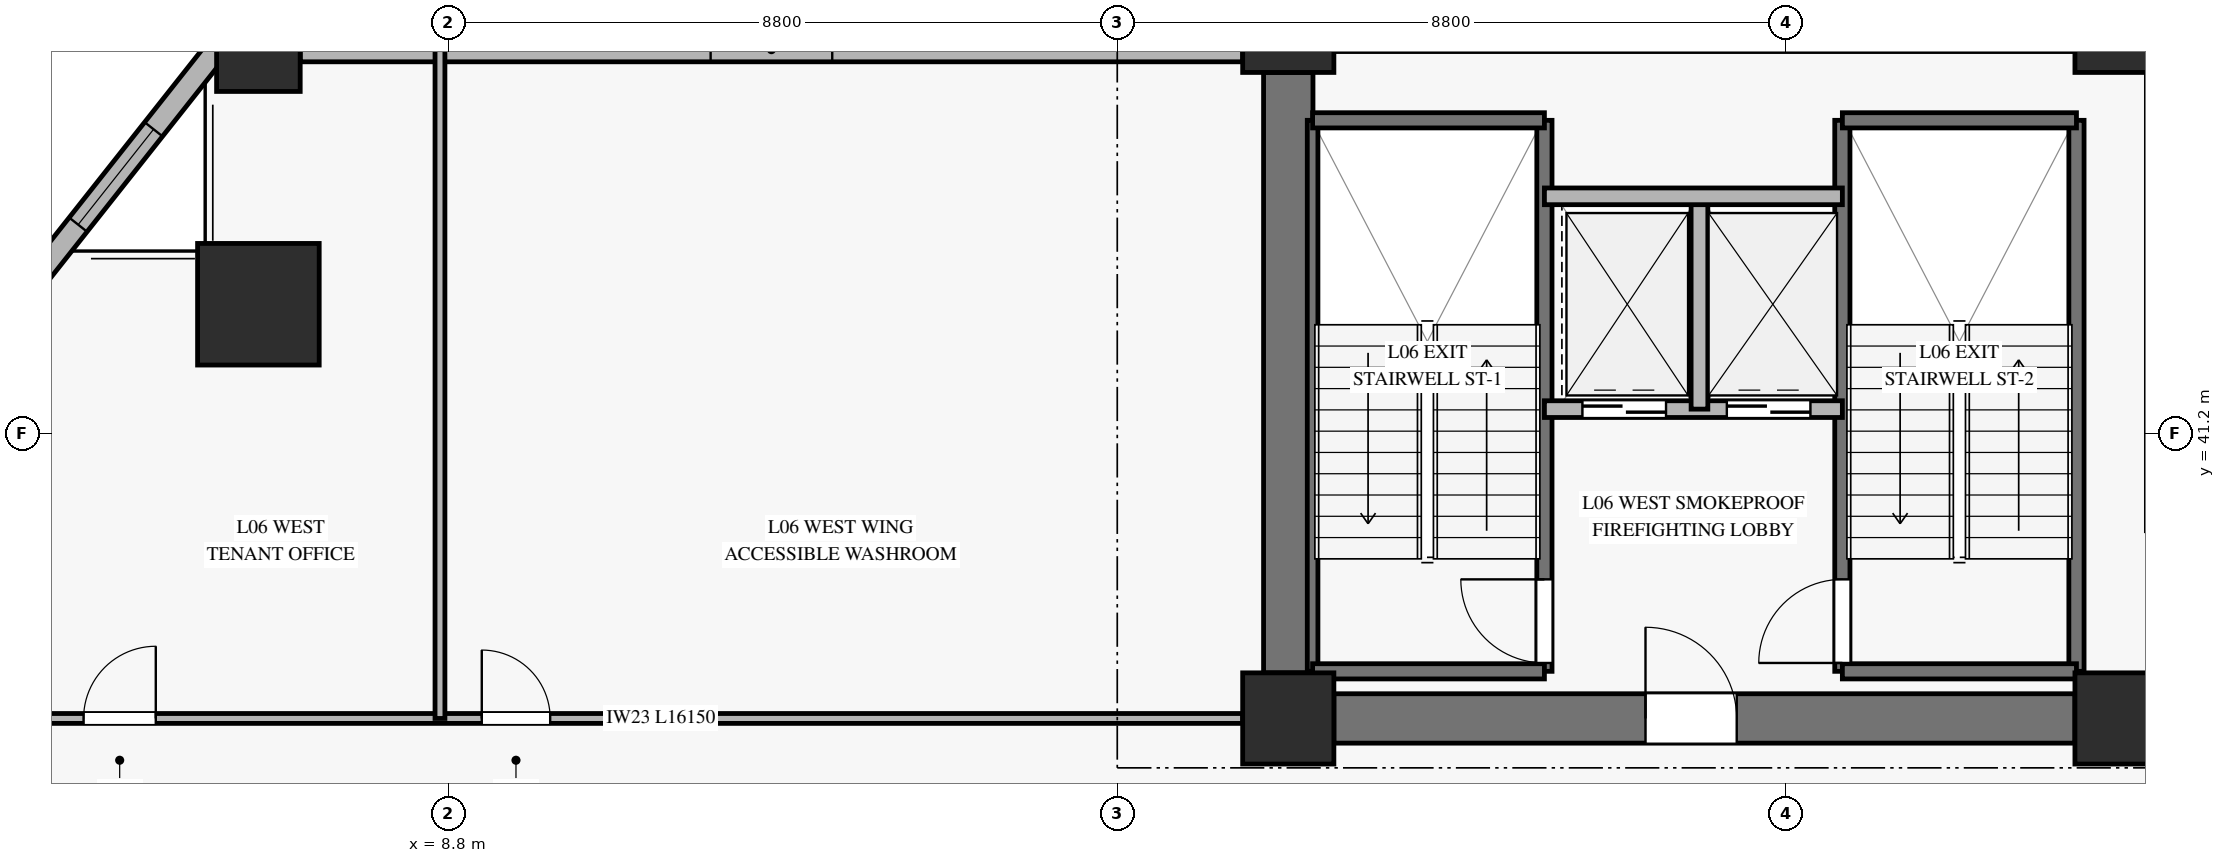
"""IFC4 building model, lengths in metres.
Left out: names, types, materials, properties, quantities, classifications, styles, units other than length and angle.
Written with IfcOpenShell. Run it as: python <this file> out.ifc"""

import sys

from ifc_helpers import new_model, si_unit, direction, frame, frame_2d, origin, origin_2d, place, context, subcontext, project, spatial, rectangle, hollow_rectangle, extrude, source, transform, mapped, element, fill, save


model = new_model("IFC4")
c1 = context("Model", 3, precision=1e-05, world=origin(), true_north=direction((0.0, 1.0)))
c2 = subcontext(c1, "Body", "Model", "MODEL_VIEW")
j1 = project(units=[si_unit("LENGTHUNIT", "METRE"), si_unit("PLANEANGLEUNIT", "RADIAN")], contexts=[c1])
p1 = place(None, origin())
s1 = spatial("IfcSite", under=j1, at=p1, CompositionType="ELEMENT")
p2 = place(p1, origin())
s2 = spatial("IfcBuilding", under=s1, at=p2, CompositionType="ELEMENT")
p3 = place(p2, frame((0.0, 0.0, 25.4)))
s3 = spatial("IfcBuildingStorey", under=s2, at=p3, CompositionType="ELEMENT", Elevation=25.4)
m1 = source(origin(), c2, "Body", "SweptSolid", [
    extrude(rectangle(XDim=1.2, YDim=1.2, at=origin_2d()), origin(), (0.0, 0.0, 1.0), 3.68),
])
for number, where, z_axis, x_axis in (
    (1, (19.85, 37.45, 0.0), (0.0, 0.0, 1.0), (1.0, 0.0, 0.0)),
    (2, (19.85, 46.55, 0.0), (0.0, 0.0, 1.0), (1.0, 0.0, 0.0)),
    (3, (30.8, 37.45, 0.0), (0.0, 0.0, 1.0), (1.0, 0.0, 0.0)),
    (4, (30.8, 46.55, 0.0), (0.0, 0.0, 1.0), (1.0, 0.0, 0.0)),
):
    element("IfcColumn", number, at=place(p3, frame(where, z_axis=z_axis, x_axis=x_axis)), inside=s3, PredefinedType="PILASTER", context=c2, shape_type="MappedRepresentation", body=[
        mapped(m1, transform((0.0, 0.0, 0.0), x_axis=(1.0, 0.0, 0.0), y_axis=(0.0, 1.0, 0.0), z_axis=(0.0, 0.0, 1.0), scale=1.0)),
    ])
p4 = place(p3, frame((20.45, 37.45, 0.0), z_axis=(0.0, 0.0, 1.0), x_axis=(1.0, 0.0, 0.0)))
e5 = element("IfcWall", 5, at=p4, inside=s3, PredefinedType="SHEAR", context=c2, shape_type="SweptSolid", body=[
    extrude(rectangle(XDim=9.75, YDim=0.65, at=frame_2d((4.875, 0.0))), origin(), (0.0, 0.0, 1.0), 3.68),
])
p5 = place(p4, frame((4.1, 0.0, 0.0)))
e6 = element("IfcOpeningElement", 6, at=p5, cuts=e5, PredefinedType="OPENING", context=c2, shape_type="SweptSolid", body=[
    extrude(rectangle(XDim=1.2, YDim=2.15, at=frame_2d((0.6, 1.075))), frame((0.0, 0.335, 0.0), z_axis=(0.0, -1.0, 0.0), x_axis=(1.0, 0.0, 0.0)), (0.0, 0.0, 1.0), 0.67),
])
p6 = place(p3, frame((19.85, 38.05, 0.0), z_axis=(0.0, 0.0, 1.0), x_axis=(0.0, 1.0, 0.0)))
e7 = element("IfcWall", 7, at=p6, inside=s3, PredefinedType="SHEAR", context=c2, shape_type="SweptSolid", body=[
    extrude(rectangle(XDim=7.9, YDim=0.65, at=frame_2d((3.95, 0.0))), origin(), (0.0, 0.0, 1.0), 3.68),
])
m2 = source(origin(), c2, "Body", "SweptSolid", [
    extrude(hollow_rectangle(XDim=1.6, YDim=1.6, WallThickness=0.075, at=origin_2d()), origin(), (0.0, 0.0, 1.0), 3.68),
])
p7 = place(p3, frame((6.3, 42.9, 0.0), z_axis=(0.0, 0.0, 1.0), x_axis=(1.0, 0.0, 0.0)))
e8 = element("IfcColumn", 8, at=p7, inside=s3, PredefinedType="COLUMN", context=c2, shape_type="MappedRepresentation", body=[
    mapped(m2, transform((0.0, 0.0, 0.0), x_axis=(1.0, 0.0, 0.0), y_axis=(0.0, 1.0, 0.0), z_axis=(0.0, 0.0, 1.0), scale=1.0)),
])
m3 = source(origin(), c2, "Body", "SweptSolid", [
    extrude(hollow_rectangle(XDim=1.1, YDim=1.1, WallThickness=0.05, at=origin_2d()), origin(), (0.0, 0.0, 1.0), 3.68),
])
p8 = place(p3, frame((6.3, 46.25, 0.0), z_axis=(0.0, 0.0, 1.0), x_axis=(1.0, 0.0, 0.0)))
e9 = element("IfcColumn", 9, at=p8, inside=s3, PredefinedType="COLUMN", context=c2, shape_type="MappedRepresentation", body=[
    mapped(m3, transform((0.0, 0.0, 0.0), x_axis=(1.0, 0.0, 0.0), y_axis=(0.0, 1.0, 0.0), z_axis=(0.0, 0.0, 1.0), scale=1.0)),
])
p9 = place(p3, frame((6.85, 46.25, 0.0), z_axis=(0.0, 0.0, 1.0), x_axis=(1.0, 0.0, 0.0)))
e10 = element("IfcWall", 10, at=p9, inside=s3, PredefinedType="SOLIDWALL", context=c2, shape_type="SweptSolid", body=[
    extrude(rectangle(XDim=12.4, YDim=0.32, at=frame_2d((6.2, 0.0))), origin(), (0.0, 0.0, 1.0), 3.16),
])
p10 = place(p9, frame((5.4, 0.0, 0.45)))
e11 = element("IfcOpeningElement", 11, at=p10, cuts=e10, PredefinedType="OPENING", context=c2, shape_type="SweptSolid", body=[
    extrude(rectangle(XDim=1.6, YDim=2.0, at=frame_2d((0.8, 1.0))), frame((0.0, 0.17, 0.0), z_axis=(0.0, -1.0, 0.0), x_axis=(1.0, 0.0, 0.0)), (0.0, 0.0, 1.0), 0.34),
])
p11 = place(p3, frame((5.75, 46.25, 0.0), z_axis=(0.0, 0.0, 1.0), x_axis=(-0.620377885234, -0.784303053361, 0.0)))
e12 = element("IfcWall", 12, at=p11, inside=s3, PredefinedType="SOLIDWALL", context=c2, shape_type="SweptSolid", body=[
    extrude(rectangle(XDim=4.271, YDim=0.3, at=frame_2d((2.136, 0.0))), origin(), (0.0, 0.0, 1.0), 3.16),
])
p12 = place(p11, frame((1.336, 0.0, 0.45)))
e13 = element("IfcOpeningElement", 13, at=p12, cuts=e12, PredefinedType="OPENING", context=c2, shape_type="SweptSolid", body=[
    extrude(rectangle(XDim=1.6, YDim=2.0, at=frame_2d((0.8, 1.0))), frame((0.0, 0.16, 0.0), z_axis=(0.0, -1.0, 0.0), x_axis=(1.0, 0.0, 0.0)), (0.0, 0.0, 1.0), 0.32),
])
p13 = place(p3, frame((20.17, 38.07, 0.0), z_axis=(0.0, 0.0, 1.0), x_axis=(0.0, 1.0, 0.0)))
e14 = element("IfcWall", 14, at=p13, inside=s3, PredefinedType="SOLIDWALL", context=c2, shape_type="SweptSolid", body=[
    extrude(rectangle(XDim=7.25, YDim=0.14, at=frame_2d((3.625, 0.0))), origin(), (0.0, 0.0, 1.0), 3.9),
])
p14 = place(p3, frame((23.22, 38.07, 0.0), z_axis=(0.0, 0.0, 1.0), x_axis=(0.0, 1.0, 0.0)))
e15 = element("IfcWall", 15, at=p14, inside=s3, PredefinedType="SOLIDWALL", context=c2, shape_type="SweptSolid", body=[
    extrude(rectangle(XDim=7.25, YDim=0.2, at=frame_2d((3.625, 0.0))), origin(), (0.0, 0.0, 1.0), 3.9),
])
p15 = place(p14, frame((0.11, 0.0, 0.0)))
e16 = element("IfcOpeningElement", 16, at=p15, cuts=e15, PredefinedType="OPENING", context=c2, shape_type="SweptSolid", body=[
    extrude(rectangle(XDim=1.1, YDim=2.15, at=frame_2d((0.55, 1.075))), frame((0.0, 0.11, 0.0), z_axis=(0.0, -1.0, 0.0), x_axis=(1.0, 0.0, 0.0)), (0.0, 0.0, 1.0), 0.22),
])
for number, where, z_axis, x_axis in (
    (17, (20.17, 45.32, 0.0), (0.0, 0.0, 1.0), (1.0, 0.0, 0.0)),
    (18, (20.17, 38.07, 0.0), (0.0, 0.0, 1.0), (1.0, 0.0, 0.0)),
):
    element("IfcWall", number, at=place(p3, frame(where, z_axis=z_axis, x_axis=x_axis)), inside=s3, PredefinedType="SOLIDWALL", context=c2, shape_type="SweptSolid", body=[
        extrude(rectangle(XDim=3.05, YDim=0.2, at=frame_2d((1.525, 0.0))), origin(), (0.0, 0.0, 1.0), 3.9),
    ])
p16 = place(p3, frame((27.14, 38.07, 0.0), z_axis=(0.0, 0.0, 1.0), x_axis=(0.0, 1.0, 0.0)))
e19 = element("IfcWall", 19, at=p16, inside=s3, PredefinedType="SOLIDWALL", context=c2, shape_type="SweptSolid", body=[
    extrude(rectangle(XDim=7.25, YDim=0.2, at=frame_2d((3.625, 0.0))), origin(), (0.0, 0.0, 1.0), 3.9),
])
p17 = place(p16, frame((0.11, 0.0, 0.0)))
e20 = element("IfcOpeningElement", 20, at=p17, cuts=e19, PredefinedType="OPENING", context=c2, shape_type="SweptSolid", body=[
    extrude(rectangle(XDim=1.1, YDim=2.15, at=frame_2d((0.55, 1.075))), frame((0.0, 0.11, 0.0), z_axis=(0.0, -1.0, 0.0), x_axis=(1.0, 0.0, 0.0)), (0.0, 0.0, 1.0), 0.22),
])
p18 = place(p3, frame((30.22, 38.07, 0.0), z_axis=(0.0, 0.0, 1.0), x_axis=(0.0, 1.0, 0.0)))
e21 = element("IfcWall", 21, at=p18, inside=s3, PredefinedType="SOLIDWALL", context=c2, shape_type="SweptSolid", body=[
    extrude(rectangle(XDim=7.25, YDim=0.2, at=frame_2d((3.625, 0.0))), origin(), (0.0, 0.0, 1.0), 3.9),
])
for number, where, z_axis, x_axis in (
    (22, (27.14, 45.32, 0.0), (0.0, 0.0, 1.0), (1.0, 0.0, 0.0)),
    (23, (27.14, 38.07, 0.0), (0.0, 0.0, 1.0), (1.0, 0.0, 0.0)),
):
    element("IfcWall", number, at=place(p3, frame(where, z_axis=z_axis, x_axis=x_axis)), inside=s3, PredefinedType="SOLIDWALL", context=c2, shape_type="SweptSolid", body=[
        extrude(rectangle(XDim=3.08, YDim=0.2, at=frame_2d((1.54, 0.0))), origin(), (0.0, 0.0, 1.0), 3.9),
    ])
p19 = place(p3, frame((23.22, 41.52, 0.0), z_axis=(0.0, 0.0, 1.0), x_axis=(1.0, 0.0, 0.0)))
e24 = element("IfcWall", 24, at=p19, inside=s3, PredefinedType="SOLIDWALL", context=c2, shape_type="SweptSolid", body=[
    extrude(rectangle(XDim=3.92, YDim=0.22, at=frame_2d((1.96, 0.0))), origin(), (0.0, 0.0, 1.0), 3.68),
])
p20 = place(p19, frame((0.5, 0.0, 0.0)))
e25 = element("IfcOpeningElement", 25, at=p20, cuts=e24, PredefinedType="OPENING", context=c2, shape_type="SweptSolid", body=[
    extrude(rectangle(XDim=1.1, YDim=2.2, at=frame_2d((0.55, 1.1))), frame((0.0, 0.12, 0.0), z_axis=(0.0, -1.0, 0.0), x_axis=(1.0, 0.0, 0.0)), (0.0, 0.0, 1.0), 0.24),
])
p21 = place(p19, frame((2.4, 0.0, 0.0)))
e26 = element("IfcOpeningElement", 26, at=p21, cuts=e24, PredefinedType="OPENING", context=c2, shape_type="SweptSolid", body=[
    extrude(rectangle(XDim=1.1, YDim=2.2, at=frame_2d((0.55, 1.1))), frame((0.0, 0.12, 0.0), z_axis=(0.0, -1.0, 0.0), x_axis=(1.0, 0.0, 0.0)), (0.0, 0.0, 1.0), 0.24),
])
p22 = place(p3, frame((25.26, 41.52, 0.0), z_axis=(0.0, 0.0, 1.0), x_axis=(0.0, 1.0, 0.0)))
e27 = element("IfcWall", 27, at=p22, inside=s3, PredefinedType="SOLIDWALL", context=c2, shape_type="SweptSolid", body=[
    extrude(rectangle(XDim=2.8, YDim=0.22, at=frame_2d((1.4, 0.0))), origin(), (0.0, 0.0, 1.0), 3.68),
])
p23 = place(p3, frame((23.22, 44.32, 0.0), z_axis=(0.0, 0.0, 1.0), x_axis=(1.0, 0.0, 0.0)))
e28 = element("IfcWall", 28, at=p23, inside=s3, PredefinedType="SOLIDWALL", context=c2, shape_type="SweptSolid", body=[
    extrude(rectangle(XDim=3.92, YDim=0.22, at=frame_2d((1.96, 0.0))), origin(), (0.0, 0.0, 1.0), 3.68),
])
p24 = place(p3, frame((3.1, 37.45, 0.0), z_axis=(0.0, 0.0, 1.0), x_axis=(1.0, 0.0, 0.0)))
e29 = element("IfcWall", 29, at=p24, inside=s3, PredefinedType="PARTITIONING", context=c2, shape_type="SweptSolid", body=[
    extrude(rectangle(XDim=16.15, YDim=0.13, at=frame_2d((8.075, 0.0))), origin(), (0.0, 0.0, 1.0), 3.165),
])
p25 = place(p24, frame((0.9, 0.0, 0.0)))
e30 = element("IfcOpeningElement", 30, at=p25, cuts=e29, PredefinedType="OPENING", context=c2, shape_type="SweptSolid", body=[
    extrude(rectangle(XDim=0.95, YDim=2.1, at=frame_2d((0.475, 1.05))), frame((0.0, 0.075, 0.0), z_axis=(0.0, -1.0, 0.0), x_axis=(1.0, 0.0, 0.0)), (0.0, 0.0, 1.0), 0.15),
])
p26 = place(p24, frame((6.139, 0.0, 0.0)))
e31 = element("IfcOpeningElement", 31, at=p26, cuts=e29, PredefinedType="OPENING", context=c2, shape_type="SweptSolid", body=[
    extrude(rectangle(XDim=0.9, YDim=2.1, at=frame_2d((0.45, 1.05))), frame((0.0, 0.075, 0.0), z_axis=(0.0, -1.0, 0.0), x_axis=(1.0, 0.0, 0.0)), (0.0, 0.0, 1.0), 0.15),
])
p27 = place(p3, frame((8.689, 37.45, 0.0), z_axis=(0.0, 0.0, 1.0), x_axis=(0.0, 1.0, 0.0)))
e32 = element("IfcWall", 32, at=p27, inside=s3, PredefinedType="PARTITIONING", context=c2, shape_type="SweptSolid", body=[
    extrude(rectangle(XDim=8.8, YDim=0.13, at=frame_2d((4.4, 0.0))), origin(), (0.0, 0.0, 1.0), 3.68),
])
m4 = source(origin(), c2, "Body", "SweptSolid", [
    extrude(rectangle(XDim=1.6, YDim=2.0, at=frame_2d((0.8, 1.0))), frame((0.0, 0.03, 0.0), z_axis=(0.0, -1.0, 0.0), x_axis=(1.0, 0.0, 0.0)), (0.0, 0.0, 1.0), 0.06),
])
p28 = place(p12, origin())
e33 = element("IfcWindow", 33, at=p28, inside=s3, PartitioningType="SINGLE_PANEL", PredefinedType="WINDOW", context=c2, shape_type="MappedRepresentation", body=[
    mapped(m4, transform((0.0, 0.0, 0.0), x_axis=(1.0, 0.0, 0.0), y_axis=(0.0, 1.0, 0.0), z_axis=(0.0, 0.0, 1.0), scale=1.0)),
])
fill(e13, e33)
m5 = source(origin(), c2, "Body", "SweptSolid", [
    extrude(rectangle(XDim=1.1, YDim=2.15, at=frame_2d((0.55, 1.075))), frame((0.0, 0.025, 0.0), z_axis=(0.0, -1.0, 0.0), x_axis=(1.0, 0.0, 0.0)), (0.0, 0.0, 1.0), 0.05),
])
p29 = place(p15, origin())
e34 = element("IfcDoor", 34, at=p29, inside=s3, OperationType="SINGLE_SWING_RIGHT", PredefinedType="DOOR", context=c2, shape_type="MappedRepresentation", body=[
    mapped(m5, transform((0.0, 0.0, 0.0), x_axis=(1.0, 0.0, 0.0), y_axis=(0.0, 1.0, 0.0), z_axis=(0.0, 0.0, 1.0), scale=1.0)),
])
fill(e16, e34)
p30 = place(p17, origin())
e35 = element("IfcDoor", 35, at=p30, inside=s3, OperationType="SINGLE_SWING_LEFT", PredefinedType="DOOR", context=c2, shape_type="MappedRepresentation", body=[
    mapped(m5, transform((0.0, 0.0, 0.0), x_axis=(1.0, 0.0, 0.0), y_axis=(0.0, 1.0, 0.0), z_axis=(0.0, 0.0, 1.0), scale=1.0)),
])
fill(e20, e35)
m6 = source(origin(), c2, "Body", "SweptSolid", [
    extrude(rectangle(XDim=1.1, YDim=2.2, at=frame_2d((0.55, 1.1))), frame((0.0, 0.025, 0.0), z_axis=(0.0, -1.0, 0.0), x_axis=(1.0, 0.0, 0.0)), (0.0, 0.0, 1.0), 0.05),
])
p31 = place(p20, origin())
e36 = element("IfcDoor", 36, at=p31, inside=s3, OperationType="SLIDING_TO_LEFT", PredefinedType="DOOR", context=c2, shape_type="MappedRepresentation", body=[
    mapped(m6, transform((0.0, 0.0, 0.0), x_axis=(1.0, 0.0, 0.0), y_axis=(0.0, 1.0, 0.0), z_axis=(0.0, 0.0, 1.0), scale=1.0)),
])
fill(e25, e36)
p32 = place(p21, origin())
e37 = element("IfcDoor", 37, at=p32, inside=s3, OperationType="SLIDING_TO_LEFT", PredefinedType="DOOR", context=c2, shape_type="MappedRepresentation", body=[
    mapped(m6, transform((0.0, 0.0, 0.0), x_axis=(1.0, 0.0, 0.0), y_axis=(0.0, 1.0, 0.0), z_axis=(0.0, 0.0, 1.0), scale=1.0)),
])
fill(e26, e37)
m7 = source(origin(), c2, "Body", "SweptSolid", [
    extrude(rectangle(XDim=1.2, YDim=2.15, at=frame_2d((0.6, 1.075))), frame((0.0, 0.025, 0.0), z_axis=(0.0, -1.0, 0.0), x_axis=(1.0, 0.0, 0.0)), (0.0, 0.0, 1.0), 0.05),
])
p33 = place(p5, origin())
e38 = element("IfcDoor", 38, at=p33, inside=s3, OperationType="SINGLE_SWING_LEFT", PredefinedType="DOOR", context=c2, shape_type="MappedRepresentation", body=[
    mapped(m7, transform((0.0, 0.0, 0.0), x_axis=(1.0, 0.0, 0.0), y_axis=(0.0, 1.0, 0.0), z_axis=(0.0, 0.0, 1.0), scale=1.0)),
])
fill(e6, e38)
m8 = source(origin(), c2, "Body", "SweptSolid", [
    extrude(rectangle(XDim=0.95, YDim=2.1, at=frame_2d((0.475, 1.05))), frame((0.0, 0.025, 0.0), z_axis=(0.0, -1.0, 0.0), x_axis=(1.0, 0.0, 0.0)), (0.0, 0.0, 1.0), 0.05),
])
p34 = place(p25, origin())
e39 = element("IfcDoor", 39, at=p34, inside=s3, OperationType="SINGLE_SWING_RIGHT", PredefinedType="DOOR", context=c2, shape_type="MappedRepresentation", body=[
    mapped(m8, transform((0.0, 0.0, 0.0), x_axis=(1.0, 0.0, 0.0), y_axis=(0.0, 1.0, 0.0), z_axis=(0.0, 0.0, 1.0), scale=1.0)),
])
fill(e30, e39)
m9 = source(origin(), c2, "Body", "SweptSolid", [
    extrude(rectangle(XDim=0.9, YDim=2.1, at=frame_2d((0.45, 1.05))), frame((0.0, 0.025, 0.0), z_axis=(0.0, -1.0, 0.0), x_axis=(1.0, 0.0, 0.0)), (0.0, 0.0, 1.0), 0.05),
])
p35 = place(p26, origin())
e40 = element("IfcDoor", 40, at=p35, inside=s3, OperationType="SINGLE_SWING_LEFT", PredefinedType="DOOR", context=c2, shape_type="MappedRepresentation", body=[
    mapped(m9, transform((0.0, 0.0, 0.0), x_axis=(1.0, 0.0, 0.0), y_axis=(0.0, 1.0, 0.0), z_axis=(0.0, 0.0, 1.0), scale=1.0)),
])
fill(e31, e40)
save(model, sys.argv[1])
